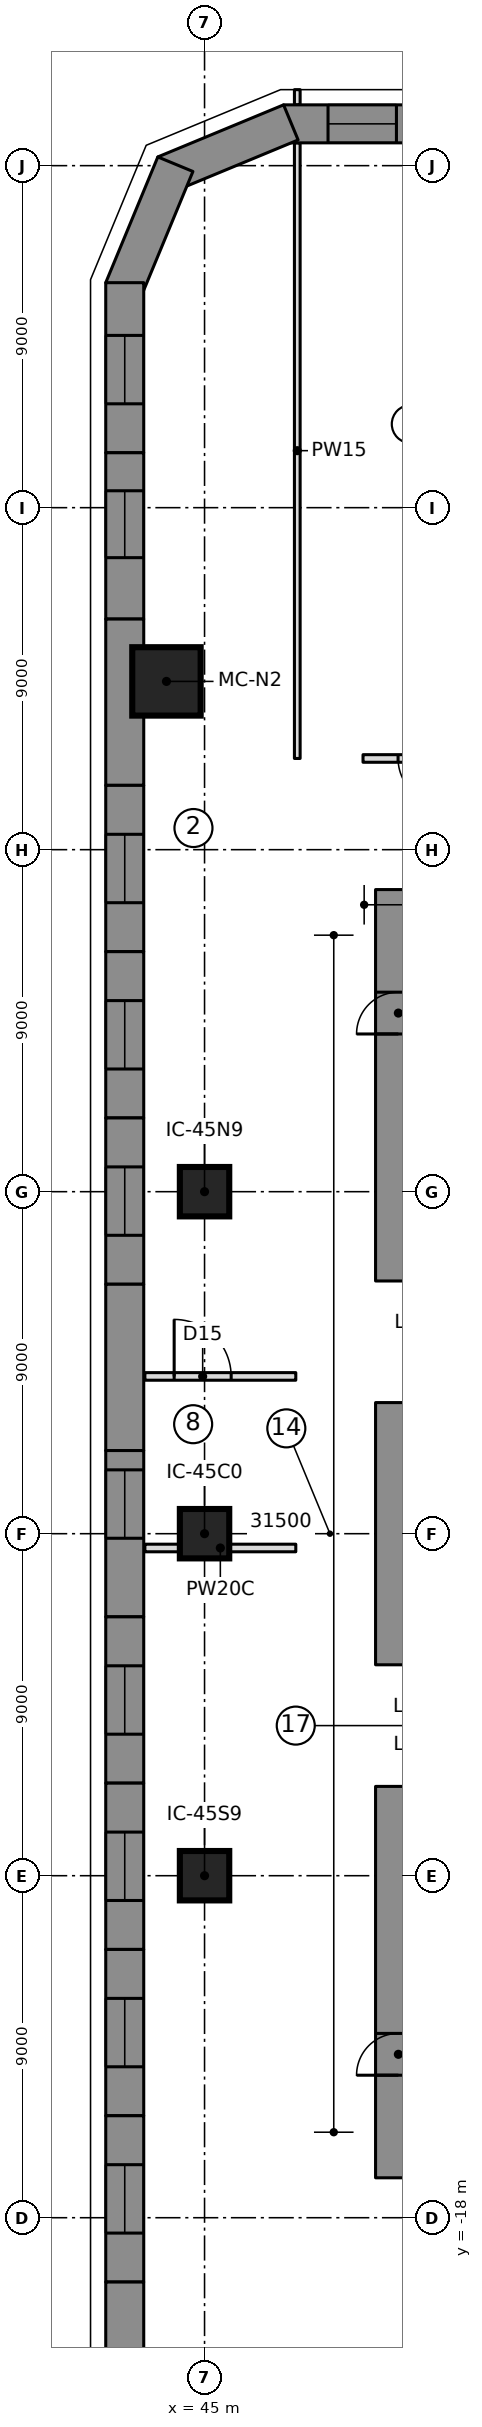
"""IFC4 building model, lengths in metres.
Left out: names, types, materials, properties, quantities, classifications, styles, units other than length and angle.
Written with IfcOpenShell. Run it as: python <this file> out.ifc"""

import sys

from ifc_helpers import new_model, si_unit, direction, frame, frame_2d, origin, origin_2d, place, context, subcontext, project, spatial, polyline, rectangle, outline, extrude, element, fill, save


model = new_model("IFC4")
c1 = context("Model", 3, precision=1e-05, world=origin(), true_north=direction((0.0, 1.0)))
c2 = subcontext(c1, "Body", "Model", "MODEL_VIEW")
j1 = project(units=[si_unit("LENGTHUNIT", "METRE"), si_unit("PLANEANGLEUNIT", "RADIAN")], contexts=[c1])
p1 = place(None, origin())
s1 = spatial("IfcSite", under=j1, at=p1, CompositionType="ELEMENT")
p2 = place(p1, origin())
s2 = spatial("IfcBuilding", under=s1, at=p2, CompositionType="ELEMENT")
p3 = place(p2, frame((0.0, 0.0, 8.0)))
s3 = spatial("IfcBuildingStorey", under=s2, at=p3, CompositionType="ELEMENT", Elevation=8.0)
p4 = place(p3, frame((50.1, 6.65, 0.0), z_axis=(0.0, 0.0, 1.0), x_axis=(0.0, 1.0, 0.0)))
e1 = element("IfcWall", 1, at=p4, inside=s3, PredefinedType="SHEAR", context=c2, shape_type="SweptSolid", body=[
    extrude(rectangle(XDim=10.3, YDim=1.2, at=frame_2d((5.15, 0.0))), origin(), (0.0, 0.0, 1.0), 5.5),
])
p5 = place(p4, frame((6.5, 0.0, 0.0)))
e2 = element("IfcOpeningElement", 2, at=p5, cuts=e1, PredefinedType="OPENING", context=c2, shape_type="SweptSolid", body=[
    extrude(rectangle(XDim=1.1, YDim=2.1, at=frame_2d((0.55, 1.05))), frame((0.0, 0.61, 0.0), z_axis=(0.0, -1.0, 0.0), x_axis=(1.0, 0.0, 0.0)), (0.0, 0.0, 1.0), 1.22),
])
p6 = place(p3, frame((50.1, -3.45, 0.0), z_axis=(0.0, 0.0, 1.0), x_axis=(0.0, 1.0, 0.0)))
e3 = element("IfcWall", 3, at=p6, inside=s3, PredefinedType="SHEAR", context=c2, shape_type="SweptSolid", body=[
    extrude(rectangle(XDim=6.9, YDim=1.2, at=frame_2d((3.45, 0.0))), origin(), (0.0, 0.0, 1.0), 5.5),
])
p7 = place(p3, frame((50.1, -16.95, 0.0), z_axis=(0.0, 0.0, 1.0), x_axis=(0.0, 1.0, 0.0)))
e4 = element("IfcWall", 4, at=p7, inside=s3, PredefinedType="SHEAR", context=c2, shape_type="SweptSolid", body=[
    extrude(rectangle(XDim=10.3, YDim=1.2, at=frame_2d((5.15, 0.0))), origin(), (0.0, 0.0, 1.0), 5.5),
])
p8 = place(p7, frame((2.7, 0.0, 0.0)))
e5 = element("IfcOpeningElement", 5, at=p8, cuts=e4, PredefinedType="OPENING", context=c2, shape_type="SweptSolid", body=[
    extrude(rectangle(XDim=1.1, YDim=2.1, at=frame_2d((0.55, 1.05))), frame((0.0, 0.61, 0.0), z_axis=(0.0, -1.0, 0.0), x_axis=(1.0, 0.0, 0.0)), (0.0, 0.0, 1.0), 1.22),
])
p9 = place(p3, frame((43.998, 22.428, 0.0), z_axis=(0.0, 0.0, 1.0), x_axis=(1.0, 0.0, 0.0)))
e6 = element("IfcColumn", 6, at=p9, inside=s3, PredefinedType="COLUMN", context=c2, shape_type="SweptSolid", body=[
    extrude(rectangle(XDim=1.8, YDim=1.8, at=origin_2d()), origin(), (0.0, 0.0, 1.0), 5.5),
])
for number, where, z_axis, x_axis in (
    (7, (45.0, -9.0, 0.0), (0.0, 0.0, 1.0), (1.0, 0.0, 0.0)),
    (8, (45.0, 0.0, 0.0), (0.0, 0.0, 1.0), (1.0, 0.0, 0.0)),
    (9, (45.0, 9.0, 0.0), (0.0, 0.0, 1.0), (1.0, 0.0, 0.0)),
):
    element("IfcColumn", number, at=place(p3, frame(where, z_axis=z_axis, x_axis=x_axis)), inside=s3, PredefinedType="COLUMN", context=c2, shape_type="SweptSolid", body=[
        extrude(rectangle(XDim=1.3, YDim=1.3, at=origin_2d()), origin(), (0.0, 0.0, 1.0), 5.5),
    ])
p10 = place(p3, frame((51.119, 37.1, 0.0), z_axis=(0.0, 0.0, 1.0), x_axis=(-1.0, 0.0, 0.0)))
e10 = element("IfcWall", 10, at=p10, inside=s3, PredefinedType="NOTDEFINED", context=c2, shape_type="SweptSolid", body=[
    extrude(outline(polyline([(0.0, -0.5), (4.04, -0.5), (3.841, 0.5), (0.0, 0.5), (0.0, -0.5)])), origin(), (0.0, 0.0, 1.0), 5.2),
])
p11 = place(p10, frame((1.07, 0.0, 0.9)))
e11 = element("IfcOpeningElement", 11, at=p11, cuts=e10, PredefinedType="OPENING", context=c2, shape_type="SweptSolid", body=[
    extrude(rectangle(XDim=1.8, YDim=2.4, at=frame_2d((0.9, 1.2))), frame((0.0, 0.51, 0.0), z_axis=(0.0, -1.0, 0.0), x_axis=(1.0, 0.0, 0.0)), (0.0, 0.0, 1.0), 1.02),
])
p12 = place(p3, frame((47.179, 37.1, 0.0), z_axis=(0.0, 0.0, 1.0), x_axis=(-0.923862365102, -0.382724875529, 0.0)))
e12 = element("IfcWall", 12, at=p12, inside=s3, PredefinedType="NOTDEFINED", context=c2, shape_type="SweptSolid", body=[
    extrude(outline(polyline([(-0.1, -0.5), (3.482, -0.5), (3.068, 0.5), (0.1, 0.5), (-0.1, -0.5)])), origin(), (0.0, 0.0, 1.0), 5.2),
])
p13 = place(p3, frame((44.153, 35.847, 0.0), z_axis=(0.0, 0.0, 1.0), x_axis=(-0.382724875529, -0.923862365102, 0.0)))
e13 = element("IfcWall", 13, at=p13, inside=s3, PredefinedType="NOTDEFINED", context=c2, shape_type="SweptSolid", body=[
    extrude(outline(polyline([(-0.207, -0.5), (3.375, -0.5), (3.175, 0.5), (0.207, 0.5), (-0.207, -0.5)])), origin(), (0.0, 0.0, 1.0), 5.2),
])
p14 = place(p3, frame((42.9, 32.821, 0.0), z_axis=(0.0, 0.0, 1.0), x_axis=(0.0, -1.0, 0.0)))
e14 = element("IfcWall", 14, at=p14, inside=s3, PredefinedType="NOTDEFINED", context=c2, shape_type="SweptSolid", body=[
    extrude(outline(polyline([(-0.1, -0.5), (4.376, -0.5), (4.376, 0.5), (0.1, 0.5), (-0.1, -0.5)])), origin(), (0.0, 0.0, 1.0), 5.2),
])
p15 = place(p14, frame((1.288, 0.0, 0.9)))
e15 = element("IfcOpeningElement", 15, at=p15, cuts=e14, PredefinedType="OPENING", context=c2, shape_type="SweptSolid", body=[
    extrude(rectangle(XDim=1.8, YDim=2.4, at=frame_2d((0.9, 1.2))), frame((0.0, 0.51, 0.0), z_axis=(0.0, -1.0, 0.0), x_axis=(1.0, 0.0, 0.0)), (0.0, 0.0, 1.0), 1.02),
])
p16 = place(p3, frame((42.9, 28.445, 0.0), z_axis=(0.0, 0.0, 1.0), x_axis=(0.0, -1.0, 0.0)))
e16 = element("IfcWall", 16, at=p16, inside=s3, PredefinedType="NOTDEFINED", context=c2, shape_type="SweptSolid", body=[
    extrude(outline(polyline([(0.0, -0.5), (4.376, -0.5), (4.376, 0.5), (0.0, 0.5), (0.0, -0.5)])), origin(), (0.0, 0.0, 1.0), 5.2),
])
p17 = place(p16, frame((1.0, 0.0, 0.9)))
e17 = element("IfcOpeningElement", 17, at=p17, cuts=e16, PredefinedType="OPENING", context=c2, shape_type="SweptSolid", body=[
    extrude(rectangle(XDim=1.76, YDim=2.4, at=frame_2d((0.88, 1.2))), frame((0.0, 0.51, 0.0), z_axis=(0.0, -1.0, 0.0), x_axis=(1.0, 0.0, 0.0)), (0.0, 0.0, 1.0), 1.02),
])
p18 = place(p3, frame((42.9, 24.069, 0.0), z_axis=(0.0, 0.0, 1.0), x_axis=(0.0, -1.0, 0.0)))
e18 = element("IfcWall", 18, at=p18, inside=s3, PredefinedType="NOTDEFINED", context=c2, shape_type="SweptSolid", body=[
    extrude(outline(polyline([(0.0, -0.5), (4.376, -0.5), (4.376, 0.5), (0.0, 0.5), (0.0, -0.5)])), origin(), (0.0, 0.0, 1.0), 5.2),
])
p19 = place(p3, frame((42.9, 19.693, 0.0), z_axis=(0.0, 0.0, 1.0), x_axis=(0.0, -1.0, 0.0)))
e19 = element("IfcWall", 19, at=p19, inside=s3, PredefinedType="NOTDEFINED", context=c2, shape_type="SweptSolid", body=[
    extrude(outline(polyline([(0.0, -0.5), (4.376, -0.5), (4.376, 0.5), (0.0, 0.5), (0.0, -0.5)])), origin(), (0.0, 0.0, 1.0), 5.2),
])
p20 = place(p19, frame((1.288, 0.0, 0.9)))
e20 = element("IfcOpeningElement", 20, at=p20, cuts=e19, PredefinedType="OPENING", context=c2, shape_type="SweptSolid", body=[
    extrude(rectangle(XDim=1.8, YDim=2.4, at=frame_2d((0.9, 1.2))), frame((0.0, 0.51, 0.0), z_axis=(0.0, -1.0, 0.0), x_axis=(1.0, 0.0, 0.0)), (0.0, 0.0, 1.0), 1.02),
])
p21 = place(p3, frame((42.9, 15.316, 0.0), z_axis=(0.0, 0.0, 1.0), x_axis=(0.0, -1.0, 0.0)))
e21 = element("IfcWall", 21, at=p21, inside=s3, PredefinedType="NOTDEFINED", context=c2, shape_type="SweptSolid", body=[
    extrude(outline(polyline([(0.0, -0.5), (4.376, -0.5), (4.376, 0.5), (0.0, 0.5), (0.0, -0.5)])), origin(), (0.0, 0.0, 1.0), 5.2),
])
p22 = place(p21, frame((1.288, 0.0, 0.9)))
e22 = element("IfcOpeningElement", 22, at=p22, cuts=e21, PredefinedType="OPENING", context=c2, shape_type="SweptSolid", body=[
    extrude(rectangle(XDim=1.8, YDim=2.4, at=frame_2d((0.9, 1.2))), frame((0.0, 0.51, 0.0), z_axis=(0.0, -1.0, 0.0), x_axis=(1.0, 0.0, 0.0)), (0.0, 0.0, 1.0), 1.02),
])
p23 = place(p3, frame((42.9, 10.94, 0.0), z_axis=(0.0, 0.0, 1.0), x_axis=(0.0, -1.0, 0.0)))
e23 = element("IfcWall", 23, at=p23, inside=s3, PredefinedType="NOTDEFINED", context=c2, shape_type="SweptSolid", body=[
    extrude(outline(polyline([(0.0, -0.5), (4.376, -0.5), (4.376, 0.5), (0.0, 0.5), (0.0, -0.5)])), origin(), (0.0, 0.0, 1.0), 5.2),
])
p24 = place(p23, frame((1.288, 0.0, 0.9)))
e24 = element("IfcOpeningElement", 24, at=p24, cuts=e23, PredefinedType="OPENING", context=c2, shape_type="SweptSolid", body=[
    extrude(rectangle(XDim=1.8, YDim=2.4, at=frame_2d((0.9, 1.2))), frame((0.0, 0.51, 0.0), z_axis=(0.0, -1.0, 0.0), x_axis=(1.0, 0.0, 0.0)), (0.0, 0.0, 1.0), 1.02),
])
p25 = place(p3, frame((42.9, 6.564, 0.0), z_axis=(0.0, 0.0, 1.0), x_axis=(0.0, -1.0, 0.0)))
e25 = element("IfcWall", 25, at=p25, inside=s3, PredefinedType="NOTDEFINED", context=c2, shape_type="SweptSolid", body=[
    extrude(outline(polyline([(0.0, -0.5), (4.376, -0.5), (4.376, 0.5), (0.0, 0.5), (0.0, -0.5)])), origin(), (0.0, 0.0, 1.0), 5.2),
])
p26 = place(p3, frame((42.9, 2.188, 0.0), z_axis=(0.0, 0.0, 1.0), x_axis=(0.0, -1.0, 0.0)))
e26 = element("IfcWall", 26, at=p26, inside=s3, PredefinedType="NOTDEFINED", context=c2, shape_type="SweptSolid", body=[
    extrude(outline(polyline([(0.0, -0.5), (4.376, -0.5), (4.376, 0.5), (0.0, 0.5), (0.0, -0.5)])), origin(), (0.0, 0.0, 1.0), 5.2),
])
p27 = place(p26, frame((0.508, 0.0, 0.9)))
e27 = element("IfcOpeningElement", 27, at=p27, cuts=e26, PredefinedType="OPENING", context=c2, shape_type="SweptSolid", body=[
    extrude(rectangle(XDim=1.8, YDim=2.4, at=frame_2d((0.9, 1.2))), frame((0.0, 0.51, 0.0), z_axis=(0.0, -1.0, 0.0), x_axis=(1.0, 0.0, 0.0)), (0.0, 0.0, 1.0), 1.02),
])
p28 = place(p3, frame((42.9, -2.188, 0.0), z_axis=(0.0, 0.0, 1.0), x_axis=(0.0, -1.0, 0.0)))
e28 = element("IfcWall", 28, at=p28, inside=s3, PredefinedType="NOTDEFINED", context=c2, shape_type="SweptSolid", body=[
    extrude(outline(polyline([(0.0, -0.5), (4.376, -0.5), (4.376, 0.5), (0.0, 0.5), (0.0, -0.5)])), origin(), (0.0, 0.0, 1.0), 5.2),
])
p29 = place(p28, frame((1.288, 0.0, 0.9)))
e29 = element("IfcOpeningElement", 29, at=p29, cuts=e28, PredefinedType="OPENING", context=c2, shape_type="SweptSolid", body=[
    extrude(rectangle(XDim=1.8, YDim=2.4, at=frame_2d((0.9, 1.2))), frame((0.0, 0.51, 0.0), z_axis=(0.0, -1.0, 0.0), x_axis=(1.0, 0.0, 0.0)), (0.0, 0.0, 1.0), 1.02),
])
p30 = place(p3, frame((42.9, -6.564, 0.0), z_axis=(0.0, 0.0, 1.0), x_axis=(0.0, -1.0, 0.0)))
e30 = element("IfcWall", 30, at=p30, inside=s3, PredefinedType="NOTDEFINED", context=c2, shape_type="SweptSolid", body=[
    extrude(outline(polyline([(0.0, -0.5), (4.376, -0.5), (4.376, 0.5), (0.0, 0.5), (0.0, -0.5)])), origin(), (0.0, 0.0, 1.0), 5.2),
])
p31 = place(p30, frame((1.288, 0.0, 0.9)))
e31 = element("IfcOpeningElement", 31, at=p31, cuts=e30, PredefinedType="OPENING", context=c2, shape_type="SweptSolid", body=[
    extrude(rectangle(XDim=1.8, YDim=2.4, at=frame_2d((0.9, 1.2))), frame((0.0, 0.51, 0.0), z_axis=(0.0, -1.0, 0.0), x_axis=(1.0, 0.0, 0.0)), (0.0, 0.0, 1.0), 1.02),
])
p32 = place(p3, frame((42.9, -10.94, 0.0), z_axis=(0.0, 0.0, 1.0), x_axis=(0.0, -1.0, 0.0)))
e32 = element("IfcWall", 32, at=p32, inside=s3, PredefinedType="NOTDEFINED", context=c2, shape_type="SweptSolid", body=[
    extrude(outline(polyline([(0.0, -0.5), (4.376, -0.5), (4.376, 0.5), (0.0, 0.5), (0.0, -0.5)])), origin(), (0.0, 0.0, 1.0), 5.2),
])
p33 = place(p32, frame((1.288, 0.0, 0.9)))
e33 = element("IfcOpeningElement", 33, at=p33, cuts=e32, PredefinedType="OPENING", context=c2, shape_type="SweptSolid", body=[
    extrude(rectangle(XDim=1.8, YDim=2.4, at=frame_2d((0.9, 1.2))), frame((0.0, 0.51, 0.0), z_axis=(0.0, -1.0, 0.0), x_axis=(1.0, 0.0, 0.0)), (0.0, 0.0, 1.0), 1.02),
])
p34 = place(p3, frame((42.9, -15.316, 0.0), z_axis=(0.0, 0.0, 1.0), x_axis=(0.0, -1.0, 0.0)))
e34 = element("IfcWall", 34, at=p34, inside=s3, PredefinedType="NOTDEFINED", context=c2, shape_type="SweptSolid", body=[
    extrude(outline(polyline([(0.0, -0.5), (4.376, -0.5), (4.376, 0.5), (0.0, 0.5), (0.0, -0.5)])), origin(), (0.0, 0.0, 1.0), 5.2),
])
p35 = place(p34, frame((1.288, 0.0, 0.9)))
e35 = element("IfcOpeningElement", 35, at=p35, cuts=e34, PredefinedType="OPENING", context=c2, shape_type="SweptSolid", body=[
    extrude(rectangle(XDim=1.8, YDim=2.4, at=frame_2d((0.9, 1.2))), frame((0.0, 0.51, 0.0), z_axis=(0.0, -1.0, 0.0), x_axis=(1.0, 0.0, 0.0)), (0.0, 0.0, 1.0), 1.02),
])
p36 = place(p3, frame((42.9, -19.693, 0.0), z_axis=(0.0, 0.0, 1.0), x_axis=(0.0, -1.0, 0.0)))
e36 = element("IfcWall", 36, at=p36, inside=s3, PredefinedType="NOTDEFINED", context=c2, shape_type="SweptSolid", body=[
    extrude(outline(polyline([(0.0, -0.5), (4.376, -0.5), (4.376, 0.5), (0.0, 0.5), (0.0, -0.5)])), origin(), (0.0, 0.0, 1.0), 5.2),
])
p37 = place(p3, frame((43.43, -0.376, 0.0), z_axis=(0.0, 0.0, 1.0), x_axis=(1.0, 0.0, 0.0)))
e37 = element("IfcWall", 37, at=p37, inside=s3, PredefinedType="PARTITIONING", context=c2, shape_type="SweptSolid", body=[
    extrude(rectangle(XDim=3.971, YDim=0.2, at=frame_2d((1.985, 0.0))), origin(), (0.0, 0.0, 1.0), 5.15),
])
p38 = place(p3, frame((43.43, 4.139, 0.0), z_axis=(0.0, 0.0, 1.0), x_axis=(1.0, 0.0, 0.0)))
e38 = element("IfcWall", 38, at=p38, inside=s3, PredefinedType="PARTITIONING", context=c2, shape_type="SweptSolid", body=[
    extrude(rectangle(XDim=3.971, YDim=0.2, at=frame_2d((1.985, 0.0))), origin(), (0.0, 0.0, 1.0), 5.15),
])
p39 = place(p38, frame((0.771, 0.0, 0.0)))
e39 = element("IfcOpeningElement", 39, at=p39, cuts=e38, PredefinedType="OPENING", context=c2, shape_type="SweptSolid", body=[
    extrude(rectangle(XDim=1.5, YDim=2.1, at=frame_2d((0.75, 1.05))), frame((0.0, 0.11, 0.0), z_axis=(0.0, -1.0, 0.0), x_axis=(1.0, 0.0, 0.0)), (0.0, 0.0, 1.0), 0.22),
])
p40 = place(p3, frame((47.44, 20.4, 0.0), z_axis=(0.0, 0.0, 1.0), x_axis=(0.0, 1.0, 0.0)))
e40 = element("IfcWall", 40, at=p40, inside=s3, PredefinedType="PARTITIONING", context=c2, shape_type="SweptSolid", body=[
    extrude(rectangle(XDim=16.2, YDim=0.15, at=frame_2d((8.1, 0.0))), origin(), (0.0, 0.0, 1.0), 5.15),
])
p41 = place(p3, frame((47.44, 37.6, 0.0), z_axis=(0.0, 0.0, 1.0), x_axis=(0.0, 1.0, 0.0)))
e41 = element("IfcWall", 41, at=p41, inside=s3, PredefinedType="PARTITIONING", context=c2, shape_type="SweptSolid", body=[
    extrude(rectangle(XDim=0.4, YDim=0.15, at=frame_2d((0.2, 0.0))), origin(), (0.0, 0.0, 1.0), 5.15),
])
p42 = place(p3, frame((52.414, 20.4, 0.0), z_axis=(0.0, 0.0, 1.0), x_axis=(-1.0, 0.0, 0.0)))
e42 = element("IfcWall", 42, at=p42, inside=s3, PredefinedType="PARTITIONING", context=c2, shape_type="SweptSolid", body=[
    extrude(rectangle(XDim=3.244, YDim=0.2, at=frame_2d((1.622, 0.0))), origin(), (0.0, 0.0, 1.0), 5.15),
])
p43 = place(p42, frame((1.122, 0.0, 0.0)))
e43 = element("IfcOpeningElement", 43, at=p43, cuts=e42, PredefinedType="OPENING", context=c2, shape_type="SweptSolid", body=[
    extrude(rectangle(XDim=1.2, YDim=2.1, at=frame_2d((0.6, 1.05))), frame((0.0, 0.11, 0.0), z_axis=(0.0, -1.0, 0.0), x_axis=(1.0, 0.0, 0.0)), (0.0, 0.0, 1.0), 0.22),
])
p44 = place(p11, origin())
e44 = element("IfcWindow", 44, at=p44, inside=s3, PartitioningType="SINGLE_PANEL", PredefinedType="WINDOW", context=c2, shape_type="SweptSolid", body=[
    extrude(rectangle(XDim=1.8, YDim=2.4, at=frame_2d((0.9, 1.2))), frame((0.0, 0.5, 0.0), z_axis=(0.0, -1.0, 0.0), x_axis=(1.0, 0.0, 0.0)), (0.0, 0.0, 1.0), 0.06),
])
fill(e11, e44)
p45 = place(p15, origin())
e45 = element("IfcWindow", 45, at=p45, inside=s3, PartitioningType="SINGLE_PANEL", PredefinedType="WINDOW", context=c2, shape_type="SweptSolid", body=[
    extrude(rectangle(XDim=1.8, YDim=2.4, at=frame_2d((0.9, 1.2))), frame((0.0, 0.5, 0.0), z_axis=(0.0, -1.0, 0.0), x_axis=(1.0, 0.0, 0.0)), (0.0, 0.0, 1.0), 0.06),
])
fill(e15, e45)
p46 = place(p17, origin())
e46 = element("IfcWindow", 46, at=p46, inside=s3, PartitioningType="SINGLE_PANEL", PredefinedType="WINDOW", context=c2, shape_type="SweptSolid", body=[
    extrude(rectangle(XDim=1.76, YDim=2.4, at=frame_2d((0.88, 1.2))), frame((0.0, 0.5, 0.0), z_axis=(0.0, -1.0, 0.0), x_axis=(1.0, 0.0, 0.0)), (0.0, 0.0, 1.0), 0.06),
])
fill(e17, e46)
p47 = place(p20, origin())
e47 = element("IfcWindow", 47, at=p47, inside=s3, PartitioningType="SINGLE_PANEL", PredefinedType="WINDOW", context=c2, shape_type="SweptSolid", body=[
    extrude(rectangle(XDim=1.8, YDim=2.4, at=frame_2d((0.9, 1.2))), frame((0.0, 0.5, 0.0), z_axis=(0.0, -1.0, 0.0), x_axis=(1.0, 0.0, 0.0)), (0.0, 0.0, 1.0), 0.06),
])
fill(e20, e47)
p48 = place(p22, origin())
e48 = element("IfcWindow", 48, at=p48, inside=s3, PartitioningType="SINGLE_PANEL", PredefinedType="WINDOW", context=c2, shape_type="SweptSolid", body=[
    extrude(rectangle(XDim=1.8, YDim=2.4, at=frame_2d((0.9, 1.2))), frame((0.0, 0.5, 0.0), z_axis=(0.0, -1.0, 0.0), x_axis=(1.0, 0.0, 0.0)), (0.0, 0.0, 1.0), 0.06),
])
fill(e22, e48)
p49 = place(p24, origin())
e49 = element("IfcWindow", 49, at=p49, inside=s3, PartitioningType="SINGLE_PANEL", PredefinedType="WINDOW", context=c2, shape_type="SweptSolid", body=[
    extrude(rectangle(XDim=1.8, YDim=2.4, at=frame_2d((0.9, 1.2))), frame((0.0, 0.5, 0.0), z_axis=(0.0, -1.0, 0.0), x_axis=(1.0, 0.0, 0.0)), (0.0, 0.0, 1.0), 0.06),
])
fill(e24, e49)
p50 = place(p27, origin())
e50 = element("IfcWindow", 50, at=p50, inside=s3, PartitioningType="SINGLE_PANEL", PredefinedType="WINDOW", context=c2, shape_type="SweptSolid", body=[
    extrude(rectangle(XDim=1.8, YDim=2.4, at=frame_2d((0.9, 1.2))), frame((0.0, 0.5, 0.0), z_axis=(0.0, -1.0, 0.0), x_axis=(1.0, 0.0, 0.0)), (0.0, 0.0, 1.0), 0.06),
])
fill(e27, e50)
p51 = place(p29, origin())
e51 = element("IfcWindow", 51, at=p51, inside=s3, PartitioningType="SINGLE_PANEL", PredefinedType="WINDOW", context=c2, shape_type="SweptSolid", body=[
    extrude(rectangle(XDim=1.8, YDim=2.4, at=frame_2d((0.9, 1.2))), frame((0.0, 0.5, 0.0), z_axis=(0.0, -1.0, 0.0), x_axis=(1.0, 0.0, 0.0)), (0.0, 0.0, 1.0), 0.06),
])
fill(e29, e51)
p52 = place(p31, origin())
e52 = element("IfcWindow", 52, at=p52, inside=s3, PartitioningType="SINGLE_PANEL", PredefinedType="WINDOW", context=c2, shape_type="SweptSolid", body=[
    extrude(rectangle(XDim=1.8, YDim=2.4, at=frame_2d((0.9, 1.2))), frame((0.0, 0.5, 0.0), z_axis=(0.0, -1.0, 0.0), x_axis=(1.0, 0.0, 0.0)), (0.0, 0.0, 1.0), 0.06),
])
fill(e31, e52)
p53 = place(p33, origin())
e53 = element("IfcWindow", 53, at=p53, inside=s3, PartitioningType="SINGLE_PANEL", PredefinedType="WINDOW", context=c2, shape_type="SweptSolid", body=[
    extrude(rectangle(XDim=1.8, YDim=2.4, at=frame_2d((0.9, 1.2))), frame((0.0, 0.5, 0.0), z_axis=(0.0, -1.0, 0.0), x_axis=(1.0, 0.0, 0.0)), (0.0, 0.0, 1.0), 0.06),
])
fill(e33, e53)
p54 = place(p35, origin())
e54 = element("IfcWindow", 54, at=p54, inside=s3, PartitioningType="SINGLE_PANEL", PredefinedType="WINDOW", context=c2, shape_type="SweptSolid", body=[
    extrude(rectangle(XDim=1.8, YDim=2.4, at=frame_2d((0.9, 1.2))), frame((0.0, 0.5, 0.0), z_axis=(0.0, -1.0, 0.0), x_axis=(1.0, 0.0, 0.0)), (0.0, 0.0, 1.0), 0.06),
])
fill(e35, e54)
p55 = place(p39, origin())
e55 = element("IfcDoor", 55, at=p55, inside=s3, OperationType="DOUBLE_DOOR_SINGLE_SWING", PredefinedType="DOOR", context=c2, shape_type="SweptSolid", body=[
    extrude(rectangle(XDim=1.5, YDim=2.1, at=frame_2d((0.75, 1.05))), frame((0.0, 0.025, 0.0), z_axis=(0.0, -1.0, 0.0), x_axis=(1.0, 0.0, 0.0)), (0.0, 0.0, 1.0), 0.05),
])
fill(e39, e55)
p56 = place(p43, origin())
e56 = element("IfcDoor", 56, at=p56, inside=s3, OperationType="SINGLE_SWING_RIGHT", PredefinedType="DOOR", context=c2, shape_type="SweptSolid", body=[
    extrude(rectangle(XDim=1.2, YDim=2.1, at=frame_2d((0.6, 1.05))), frame((0.0, 0.025, 0.0), z_axis=(0.0, -1.0, 0.0), x_axis=(1.0, 0.0, 0.0)), (0.0, 0.0, 1.0), 0.05),
])
fill(e43, e56)
p57 = place(p5, origin())
e57 = element("IfcDoor", 57, at=p57, inside=s3, OperationType="SINGLE_SWING_RIGHT", PredefinedType="DOOR", context=c2, shape_type="SweptSolid", body=[
    extrude(rectangle(XDim=1.1, YDim=2.1, at=frame_2d((0.55, 1.05))), frame((0.0, 0.025, 0.0), z_axis=(0.0, -1.0, 0.0), x_axis=(1.0, 0.0, 0.0)), (0.0, 0.0, 1.0), 0.05),
])
fill(e2, e57)
p58 = place(p8, origin())
e58 = element("IfcDoor", 58, at=p58, inside=s3, OperationType="SINGLE_SWING_RIGHT", PredefinedType="DOOR", context=c2, shape_type="SweptSolid", body=[
    extrude(rectangle(XDim=1.1, YDim=2.1, at=frame_2d((0.55, 1.05))), frame((0.0, 0.025, 0.0), z_axis=(0.0, -1.0, 0.0), x_axis=(1.0, 0.0, 0.0)), (0.0, 0.0, 1.0), 0.05),
])
fill(e5, e58)
save(model, sys.argv[1])
